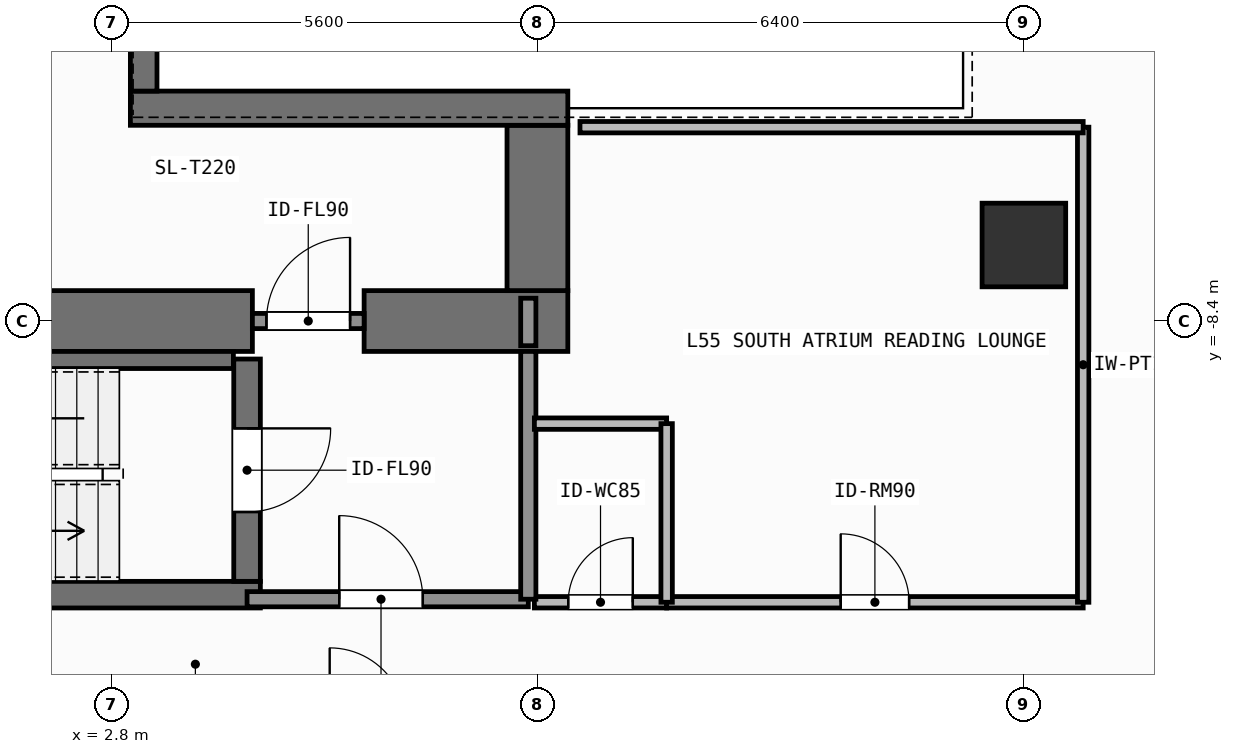
"""IFC4 building model, lengths in metres.
Left out: names, types, materials, properties, quantities, classifications, styles, units other than length and angle.
Written with IfcOpenShell. Run it as: python <this file> out.ifc"""

import sys

from ifc_helpers import new_model, si_unit, direction, frame, frame_2d, origin, origin_2d, place, context, subcontext, project, spatial, rectangle, extrude, element, fill, save


model = new_model("IFC4")
c1 = context("Model", 3, precision=1e-05, world=origin(), true_north=direction((0.0, 1.0)))
c2 = subcontext(c1, "Body", "Model", "MODEL_VIEW")
j1 = project(units=[si_unit("LENGTHUNIT", "METRE"), si_unit("PLANEANGLEUNIT", "RADIAN")], contexts=[c1])
p1 = place(None, origin())
s1 = spatial("IfcSite", under=j1, at=p1, CompositionType="ELEMENT")
p2 = place(p1, origin())
s2 = spatial("IfcBuilding", under=s1, at=p2, CompositionType="ELEMENT")
p3 = place(p2, frame((0.0, 0.0, 223.5)))
s3 = spatial("IfcBuildingStorey", under=s2, at=p3, CompositionType="ELEMENT", Elevation=223.5)
p4 = place(p3, frame((-2.62, -8.4, 0.0), z_axis=(0.0, 0.0, 1.0), x_axis=(1.0, 0.0, 0.0)))
e1 = element("IfcWall", 1, at=p4, inside=s3, PredefinedType="SHEAR", context=c2, shape_type="SweptSolid", body=[
    extrude(rectangle(XDim=7.27, YDim=0.8, at=frame_2d((3.635, 0.0))), origin(), (0.0, 0.0, 1.0), 3.9),
])
p5 = place(p3, frame((6.12, -8.4, 0.0), z_axis=(0.0, 0.0, 1.0), x_axis=(1.0, 0.0, 0.0)))
e2 = element("IfcWall", 2, at=p5, inside=s3, PredefinedType="SHEAR", context=c2, shape_type="SweptSolid", body=[
    extrude(rectangle(XDim=2.68, YDim=0.8, at=frame_2d((1.34, 0.0))), origin(), (0.0, 0.0, 1.0), 3.9),
])
p6 = place(p3, frame((8.4, -8.0, 0.0), z_axis=(0.0, 0.0, 1.0), x_axis=(0.0, 1.0, 0.0)))
e3 = element("IfcWall", 3, at=p6, inside=s3, PredefinedType="SHEAR", context=c2, shape_type="SweptSolid", body=[
    extrude(rectangle(XDim=2.175, YDim=0.8, at=frame_2d((1.087, 0.0))), origin(), (0.0, 0.0, 1.0), 3.9),
])
p7 = place(p3, frame((3.045, -5.6, 0.0), z_axis=(0.0, 0.0, 1.0), x_axis=(1.0, 0.0, 0.0)))
e4 = element("IfcWall", 4, at=p7, inside=s3, PredefinedType="SHEAR", context=c2, shape_type="SweptSolid", body=[
    extrude(rectangle(XDim=5.755, YDim=0.45, at=frame_2d((2.877, 0.0))), origin(), (0.0, 0.0, 1.0), 3.9),
])
p8 = place(p3, frame((3.22, -5.375, 0.0), z_axis=(0.0, 0.0, 1.0), x_axis=(0.0, 1.0, 0.0)))
e5 = element("IfcWall", 5, at=p8, inside=s3, PredefinedType="SHEAR", context=c2, shape_type="SweptSolid", body=[
    extrude(rectangle(XDim=10.75, YDim=0.35, at=frame_2d((5.375, 0.0))), origin(), (0.0, 0.0, 1.0), 3.9),
])
p9 = place(p3, frame((-2.555, -12.0, 0.0), z_axis=(0.0, 0.0, 1.0), x_axis=(1.0, 0.0, 0.0)))
e6 = element("IfcWall", 6, at=p9, inside=s3, PredefinedType="SHEAR", context=c2, shape_type="SweptSolid", body=[
    extrude(rectangle(XDim=7.31, YDim=0.35, at=frame_2d((3.655, 0.0))), origin(), (0.0, 0.0, 1.0), 3.9),
])
p10 = place(p3, frame((-2.2, -8.913, 0.0), z_axis=(0.0, 0.0, 1.0), x_axis=(1.0, 0.0, 0.0)))
e7 = element("IfcWall", 7, at=p10, inside=s3, PredefinedType="SHEAR", context=c2, shape_type="SweptSolid", body=[
    extrude(rectangle(XDim=6.6, YDim=0.225, at=frame_2d((3.3, 0.0))), origin(), (0.0, 0.0, 1.0), 3.9),
])
p11 = place(p3, frame((4.58, -8.9, 0.0), z_axis=(0.0, 0.0, 1.0), x_axis=(0.0, -1.0, 0.0)))
e8 = element("IfcWall", 8, at=p11, inside=s3, PredefinedType="SHEAR", context=c2, shape_type="SweptSolid", body=[
    extrude(rectangle(XDim=2.925, YDim=0.35, at=frame_2d((1.462, 0.0))), origin(), (0.0, 0.0, 1.0), 3.9),
])
p12 = place(p11, frame((0.913, 0.0, 0.0)))
e9 = element("IfcOpeningElement", 9, at=p12, cuts=e8, PredefinedType="OPENING", context=c2, shape_type="SweptSolid", body=[
    extrude(rectangle(XDim=1.1, YDim=2.15, at=frame_2d((0.55, 1.075))), frame((0.0, 0.185, 0.0), z_axis=(0.0, -1.0, 0.0), x_axis=(1.0, 0.0, 0.0)), (0.0, 0.0, 1.0), 0.37),
])
p13 = place(p3, frame((14.8, -7.4, 0.0), z_axis=(0.0, 0.0, 1.0), x_axis=(1.0, 0.0, 0.0)))
e10 = element("IfcColumn", 10, at=p13, inside=s3, PredefinedType="COLUMN", context=c2, shape_type="SweptSolid", body=[
    extrude(rectangle(XDim=1.1, YDim=1.1, at=origin_2d()), origin(), (0.0, 0.0, 1.0), 3.9),
])
p14 = place(p3, frame((4.58, -12.06, 0.0), z_axis=(0.0, 0.0, 1.0), x_axis=(1.0, 0.0, 0.0)))
e11 = element("IfcWall", 11, at=p14, inside=s3, PredefinedType="SOLIDWALL", context=c2, shape_type="SweptSolid", body=[
    extrude(rectangle(XDim=3.7, YDim=0.2, at=frame_2d((1.85, 0.0))), origin(), (0.0, 0.0, 1.0), 3.68),
])
p15 = place(p14, frame((1.212, 0.0, 0.0)))
e12 = element("IfcOpeningElement", 12, at=p15, cuts=e11, PredefinedType="OPENING", context=c2, shape_type="SweptSolid", body=[
    extrude(rectangle(XDim=1.1, YDim=2.15, at=frame_2d((0.55, 1.075))), frame((0.0, 0.11, 0.0), z_axis=(0.0, -1.0, 0.0), x_axis=(1.0, 0.0, 0.0)), (0.0, 0.0, 1.0), 0.22),
])
p16 = place(p3, frame((4.65, -8.4, 0.0), z_axis=(0.0, 0.0, 1.0), x_axis=(1.0, 0.0, 0.0)))
e13 = element("IfcWall", 13, at=p16, inside=s3, PredefinedType="SOLIDWALL", context=c2, shape_type="SweptSolid", body=[
    extrude(rectangle(XDim=1.47, YDim=0.2, at=frame_2d((0.735, 0.0))), origin(), (0.0, 0.0, 1.0), 2.82),
])
p17 = place(p16, frame((0.185, 0.0, 0.0)))
e14 = element("IfcOpeningElement", 14, at=p17, cuts=e13, PredefinedType="OPENING", context=c2, shape_type="SweptSolid", body=[
    extrude(rectangle(XDim=1.1, YDim=2.15, at=frame_2d((0.55, 1.075))), frame((0.0, 0.11, 0.0), z_axis=(0.0, -1.0, 0.0), x_axis=(1.0, 0.0, 0.0)), (0.0, 0.0, 1.0), 0.22),
])
p18 = place(p3, frame((8.36, -12.1, 0.0), z_axis=(0.0, 0.0, 1.0), x_axis=(1.0, 0.0, 0.0)))
e15 = element("IfcWall", 15, at=p18, inside=s3, PredefinedType="PARTITIONING", context=c2, shape_type="SweptSolid", body=[
    extrude(rectangle(XDim=1.74, YDim=0.15, at=frame_2d((0.87, 0.0))), origin(), (0.0, 0.0, 1.0), 3.68),
])
p19 = place(p18, frame((0.445, 0.0, 0.0)))
e16 = element("IfcOpeningElement", 16, at=p19, cuts=e15, PredefinedType="OPENING", context=c2, shape_type="SweptSolid", body=[
    extrude(rectangle(XDim=0.85, YDim=2.1, at=frame_2d((0.425, 1.05))), frame((0.0, 0.085, 0.0), z_axis=(0.0, -1.0, 0.0), x_axis=(1.0, 0.0, 0.0)), (0.0, 0.0, 1.0), 0.17),
])
p20 = place(p3, frame((10.1, -12.1, 0.0), z_axis=(0.0, 0.0, 1.0), x_axis=(1.0, 0.0, 0.0)))
e17 = element("IfcWall", 17, at=p20, inside=s3, PredefinedType="PARTITIONING", context=c2, shape_type="SweptSolid", body=[
    extrude(rectangle(XDim=5.48, YDim=0.15, at=frame_2d((2.74, 0.0))), origin(), (0.0, 0.0, 1.0), 3.68),
])
p21 = place(p20, frame((2.29, 0.0, 0.0)))
e18 = element("IfcOpeningElement", 18, at=p21, cuts=e17, PredefinedType="OPENING", context=c2, shape_type="SweptSolid", body=[
    extrude(rectangle(XDim=0.9, YDim=2.1, at=frame_2d((0.45, 1.05))), frame((0.0, 0.085, 0.0), z_axis=(0.0, -1.0, 0.0), x_axis=(1.0, 0.0, 0.0)), (0.0, 0.0, 1.0), 0.17),
])
p22 = place(p3, frame((8.28, -12.06, 0.0), z_axis=(0.0, 0.0, 1.0), x_axis=(0.0, 1.0, 0.0)))
e19 = element("IfcWall", 19, at=p22, inside=s3, PredefinedType="SOLIDWALL", context=c2, shape_type="SweptSolid", body=[
    extrude(rectangle(XDim=3.26, YDim=0.2, at=frame_2d((1.63, 0.0))), origin(), (0.0, 0.0, 1.0), 3.68),
])
p23 = place(p3, frame((8.28, -8.725, 0.0), z_axis=(0.0, 0.0, 1.0), x_axis=(0.0, 1.0, 0.0)))
e20 = element("IfcWall", 20, at=p23, inside=s3, PredefinedType="SOLIDWALL", context=c2, shape_type="SweptSolid", body=[
    extrude(rectangle(XDim=0.625, YDim=0.2, at=frame_2d((0.312, 0.0))), origin(), (0.0, 0.0, 1.0), 3.68),
])
p24 = place(p3, frame((8.36, -9.75, 0.0), z_axis=(0.0, 0.0, 1.0), x_axis=(1.0, 0.0, 0.0)))
e21 = element("IfcWall", 21, at=p24, inside=s3, PredefinedType="PARTITIONING", context=c2, shape_type="SweptSolid", body=[
    extrude(rectangle(XDim=1.74, YDim=0.15, at=frame_2d((0.87, 0.0))), origin(), (0.0, 0.0, 1.0), 3.68),
])
p25 = place(p3, frame((10.1, -12.1, 0.0), z_axis=(0.0, 0.0, 1.0), x_axis=(0.0, 1.0, 0.0)))
e22 = element("IfcWall", 22, at=p25, inside=s3, PredefinedType="PARTITIONING", context=c2, shape_type="SweptSolid", body=[
    extrude(rectangle(XDim=2.35, YDim=0.15, at=frame_2d((1.175, 0.0))), origin(), (0.0, 0.0, 1.0), 3.68),
])
p26 = place(p3, frame((15.58, -12.1, 0.0), z_axis=(0.0, 0.0, 1.0), x_axis=(0.0, 1.0, 0.0)))
e23 = element("IfcWall", 23, at=p26, inside=s3, PredefinedType="PARTITIONING", context=c2, shape_type="SweptSolid", body=[
    extrude(rectangle(XDim=6.25, YDim=0.15, at=frame_2d((3.125, 0.0))), origin(), (0.0, 0.0, 1.0), 3.68),
])
p27 = place(p3, frame((8.96, -5.85, 0.0), z_axis=(0.0, 0.0, 1.0), x_axis=(1.0, 0.0, 0.0)))
e24 = element("IfcWall", 24, at=p27, inside=s3, PredefinedType="PARTITIONING", context=c2, shape_type="SweptSolid", body=[
    extrude(rectangle(XDim=6.62, YDim=0.15, at=frame_2d((3.31, 0.0))), origin(), (0.0, 0.0, 1.0), 3.68),
])
p28 = place(p12, origin())
e25 = element("IfcDoor", 25, at=p28, inside=s3, OperationType="SINGLE_SWING_LEFT", PredefinedType="DOOR", context=c2, shape_type="SweptSolid", body=[
    extrude(rectangle(XDim=1.1, YDim=2.15, at=frame_2d((0.55, 1.075))), frame((0.0, 0.025, 0.0), z_axis=(0.0, -1.0, 0.0), x_axis=(1.0, 0.0, 0.0)), (0.0, 0.0, 1.0), 0.05),
])
fill(e9, e25)
p29 = place(p15, origin())
e26 = element("IfcDoor", 26, at=p29, inside=s3, OperationType="SINGLE_SWING_LEFT", PredefinedType="DOOR", context=c2, shape_type="SweptSolid", body=[
    extrude(rectangle(XDim=1.1, YDim=2.15, at=frame_2d((0.55, 1.075))), frame((0.0, 0.025, 0.0), z_axis=(0.0, -1.0, 0.0), x_axis=(1.0, 0.0, 0.0)), (0.0, 0.0, 1.0), 0.05),
])
fill(e12, e26)
p30 = place(p17, origin())
e27 = element("IfcDoor", 27, at=p30, inside=s3, OperationType="SINGLE_SWING_RIGHT", PredefinedType="DOOR", context=c2, shape_type="SweptSolid", body=[
    extrude(rectangle(XDim=1.1, YDim=2.15, at=frame_2d((0.55, 1.075))), frame((0.0, 0.025, 0.0), z_axis=(0.0, -1.0, 0.0), x_axis=(1.0, 0.0, 0.0)), (0.0, 0.0, 1.0), 0.05),
])
fill(e14, e27)
p31 = place(p19, origin())
e28 = element("IfcDoor", 28, at=p31, inside=s3, OperationType="SINGLE_SWING_RIGHT", PredefinedType="DOOR", context=c2, shape_type="SweptSolid", body=[
    extrude(rectangle(XDim=0.85, YDim=2.1, at=frame_2d((0.425, 1.05))), frame((0.0, 0.025, 0.0), z_axis=(0.0, -1.0, 0.0), x_axis=(1.0, 0.0, 0.0)), (0.0, 0.0, 1.0), 0.05),
])
fill(e16, e28)
p32 = place(p21, origin())
e29 = element("IfcDoor", 29, at=p32, inside=s3, OperationType="SINGLE_SWING_LEFT", PredefinedType="DOOR", context=c2, shape_type="SweptSolid", body=[
    extrude(rectangle(XDim=0.9, YDim=2.1, at=frame_2d((0.45, 1.05))), frame((0.0, 0.025, 0.0), z_axis=(0.0, -1.0, 0.0), x_axis=(1.0, 0.0, 0.0)), (0.0, 0.0, 1.0), 0.05),
])
fill(e18, e29)
save(model, sys.argv[1])
